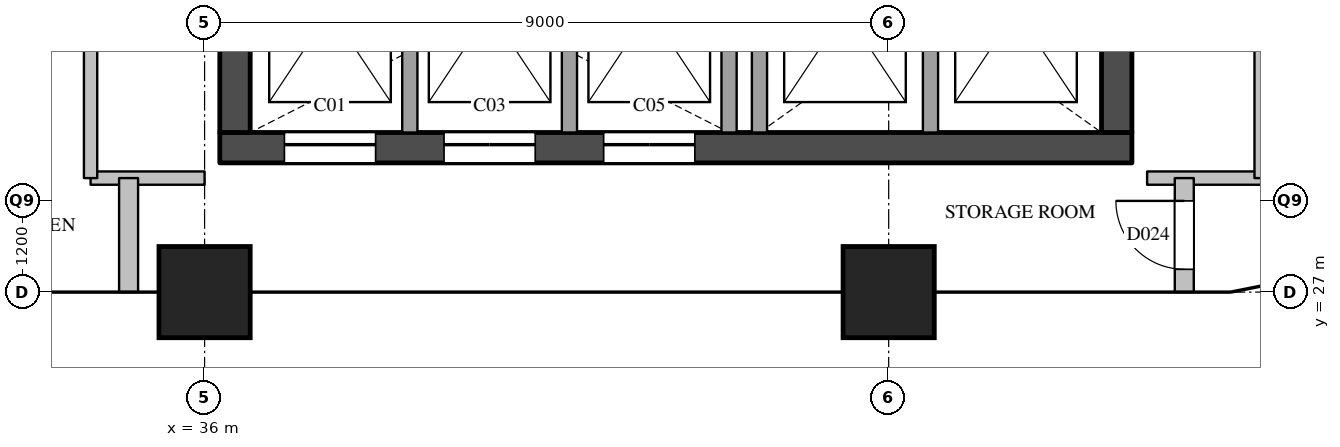
"""IFC4 building model, lengths in metres.
Left out: names, types, materials, properties, quantities, classifications, styles, units other than length and angle.
Written with IfcOpenShell. Run it as: python <this file> out.ifc"""

import sys

from ifc_helpers import new_model, si_unit, direction, frame, frame_2d, origin, origin_2d, place, context, subcontext, project, spatial, rectangle, extrude, element, fill, save


model = new_model("IFC4")
c1 = context("Model", 3, precision=1e-05, world=origin(), true_north=direction((0.0, 1.0)))
c2 = subcontext(c1, "Body", "Model", "MODEL_VIEW")
j1 = project(units=[si_unit("LENGTHUNIT", "METRE"), si_unit("PLANEANGLEUNIT", "RADIAN")], contexts=[c1])
p1 = place(None, origin())
s1 = spatial("IfcSite", under=j1, at=p1, CompositionType="ELEMENT")
p2 = place(p1, origin())
s2 = spatial("IfcBuilding", under=s1, at=p2, CompositionType="ELEMENT")
p3 = place(p2, frame((0.0, 0.0, 234.5)))
s3 = spatial("IfcBuildingStorey", under=s2, at=p3, CompositionType="ELEMENT", Elevation=234.5)
for number, where, z_axis, x_axis in (
    (1, (36.0, 27.0, 0.0), (0.0, 0.0, 1.0), (1.0, 0.0, 0.0)),
    (2, (45.0, 27.0, 0.0), (0.0, 0.0, 1.0), (1.0, 0.0, 0.0)),
):
    element("IfcColumn", number, at=place(p3, frame(where, z_axis=z_axis, x_axis=x_axis)), inside=s3, PredefinedType="COLUMN", context=c2, shape_type="SweptSolid", body=[
        extrude(rectangle(XDim=1.2, YDim=1.2, at=origin_2d()), origin(), (0.0, 0.0, 1.0), 3.9),
    ])
p4 = place(p3, frame((36.2, 28.9, 0.0), z_axis=(0.0, 0.0, 1.0), x_axis=(1.0, 0.0, 0.0)))
e3 = element("IfcWall", 3, at=p4, inside=s3, PredefinedType="SHEAR", context=c2, shape_type="SweptSolid", body=[
    extrude(rectangle(XDim=12.0, YDim=0.4, at=frame_2d((6.0, 0.0))), origin(), (0.0, 0.0, 1.0), 3.6),
])
p5 = place(p4, frame((0.85, 0.0, 0.0)))
e4 = element("IfcOpeningElement", 4, at=p5, cuts=e3, PredefinedType="OPENING", context=c2, shape_type="SweptSolid", body=[
    extrude(rectangle(XDim=1.2, YDim=2.1, at=frame_2d((0.6, 1.05))), frame((0.0, 0.21, 0.0), z_axis=(0.0, -1.0, 0.0), x_axis=(1.0, 0.0, 0.0)), (0.0, 0.0, 1.0), 0.42),
])
p6 = place(p4, frame((2.95, 0.0, 0.0)))
e5 = element("IfcOpeningElement", 5, at=p6, cuts=e3, PredefinedType="OPENING", context=c2, shape_type="SweptSolid", body=[
    extrude(rectangle(XDim=1.2, YDim=2.1, at=frame_2d((0.6, 1.05))), frame((0.0, 0.21, 0.0), z_axis=(0.0, -1.0, 0.0), x_axis=(1.0, 0.0, 0.0)), (0.0, 0.0, 1.0), 0.42),
])
p7 = place(p4, frame((5.05, 0.0, 0.0)))
e6 = element("IfcOpeningElement", 6, at=p7, cuts=e3, PredefinedType="OPENING", context=c2, shape_type="SweptSolid", body=[
    extrude(rectangle(XDim=1.2, YDim=2.1, at=frame_2d((0.6, 1.05))), frame((0.0, 0.21, 0.0), z_axis=(0.0, -1.0, 0.0), x_axis=(1.0, 0.0, 0.0)), (0.0, 0.0, 1.0), 0.42),
])
p8 = place(p3, frame((36.4, 29.1, 0.0), z_axis=(0.0, 0.0, 1.0), x_axis=(0.0, 1.0, 0.0)))
e7 = element("IfcWall", 7, at=p8, inside=s3, PredefinedType="SHEAR", context=c2, shape_type="SweptSolid", body=[
    extrude(rectangle(XDim=20.3, YDim=0.4, at=frame_2d((10.15, 0.0))), origin(), (0.0, 0.0, 1.0), 3.6),
])
p9 = place(p8, frame((3.6, 0.0, 0.0)))
e8 = element("IfcOpeningElement", 8, at=p9, cuts=e7, PredefinedType="OPENING", context=c2, shape_type="SweptSolid", body=[
    extrude(rectangle(XDim=1.8, YDim=2.1, at=frame_2d((0.9, 1.05))), frame((0.0, 0.21, 0.0), z_axis=(0.0, -1.0, 0.0), x_axis=(1.0, 0.0, 0.0)), (0.0, 0.0, 1.0), 0.42),
])
p10 = place(p8, frame((16.4, 0.0, 0.0)))
e9 = element("IfcOpeningElement", 9, at=p10, cuts=e7, PredefinedType="OPENING", context=c2, shape_type="SweptSolid", body=[
    extrude(rectangle(XDim=1.0, YDim=2.1, at=frame_2d((0.5, 1.05))), frame((0.0, 0.21, 0.0), z_axis=(0.0, -1.0, 0.0), x_axis=(1.0, 0.0, 0.0)), (0.0, 0.0, 1.0), 0.42),
])
p11 = place(p3, frame((48.0, 29.1, 0.0), z_axis=(0.0, 0.0, 1.0), x_axis=(0.0, 1.0, 0.0)))
e10 = element("IfcWall", 10, at=p11, inside=s3, PredefinedType="SHEAR", context=c2, shape_type="SweptSolid", body=[
    extrude(rectangle(XDim=20.3, YDim=0.4, at=frame_2d((10.15, 0.0))), origin(), (0.0, 0.0, 1.0), 3.6),
])
p12 = place(p11, frame((12.5, 0.0, 0.0)))
e11 = element("IfcOpeningElement", 11, at=p12, cuts=e10, PredefinedType="OPENING", context=c2, shape_type="SweptSolid", body=[
    extrude(rectangle(XDim=0.7, YDim=2.1, at=frame_2d((0.35, 1.05))), frame((0.0, 0.21, 0.0), z_axis=(0.0, -1.0, 0.0), x_axis=(1.0, 0.0, 0.0)), (0.0, 0.0, 1.0), 0.42),
])
p13 = place(p11, frame((3.9, 0.0, 0.0)))
e12 = element("IfcOpeningElement", 12, at=p13, cuts=e10, PredefinedType="OPENING", context=c2, shape_type="SweptSolid", body=[
    extrude(rectangle(XDim=1.8, YDim=2.1, at=frame_2d((0.9, 1.05))), frame((0.0, 0.21, 0.0), z_axis=(0.0, -1.0, 0.0), x_axis=(1.0, 0.0, 0.0)), (0.0, 0.0, 1.0), 0.42),
])
for number, where, z_axis, x_axis in (
    (13, (38.7, 29.1, 0.0), (0.0, 0.0, 1.0), (0.0, 1.0, 0.0)),
    (14, (40.8, 29.1, 0.0), (0.0, 0.0, 1.0), (0.0, 1.0, 0.0)),
    (15, (42.9, 29.1, 0.0), (0.0, 0.0, 1.0), (0.0, 1.0, 0.0)),
):
    element("IfcWall", number, at=place(p3, frame(where, z_axis=z_axis, x_axis=x_axis)), inside=s3, PredefinedType="SOLIDWALL", context=c2, shape_type="SweptSolid", body=[
        extrude(rectangle(XDim=3.2, YDim=0.2, at=frame_2d((1.6, 0.0))), origin(), (0.0, 0.0, 1.0), 3.6),
    ])
p14 = place(p3, frame((43.3, 29.1, 0.0), z_axis=(0.0, 0.0, 1.0), x_axis=(0.0, 1.0, 0.0)))
e16 = element("IfcWall", 16, at=p14, inside=s3, PredefinedType="SOLIDWALL", context=c2, shape_type="SweptSolid", body=[
    extrude(rectangle(XDim=9.9, YDim=0.2, at=frame_2d((4.95, 0.0))), origin(), (0.0, 0.0, 1.0), 3.6),
])
p15 = place(p3, frame((45.55, 29.1, 0.0), z_axis=(0.0, 0.0, 1.0), x_axis=(0.0, 1.0, 0.0)))
e17 = element("IfcWall", 17, at=p15, inside=s3, PredefinedType="SOLIDWALL", context=c2, shape_type="SweptSolid", body=[
    extrude(rectangle(XDim=3.2, YDim=0.2, at=frame_2d((1.6, 0.0))), origin(), (0.0, 0.0, 1.0), 3.6),
])
for number, where, z_axis, x_axis in (
    (18, (34.5, 28.5, 0.0), (0.0, 0.0, 1.0), (1.0, 0.0, 0.0)),
    (19, (48.4, 28.5, 0.0), (0.0, 0.0, 1.0), (1.0, 0.0, 0.0)),
):
    element("IfcWall", number, at=place(p3, frame(where, z_axis=z_axis, x_axis=x_axis)), inside=s3, PredefinedType="PARTITIONING", context=c2, shape_type="SweptSolid", body=[
        extrude(rectangle(XDim=1.5, YDim=0.175, at=frame_2d((0.75, 0.0))), origin(), (0.0, 0.0, 1.0), 3.6),
    ])
p16 = place(p3, frame((34.5, 28.5, 0.0), z_axis=(0.0, 0.0, 1.0), x_axis=(0.0, 1.0, 0.0)))
e20 = element("IfcWall", 20, at=p16, inside=s3, PredefinedType="PARTITIONING", context=c2, shape_type="SweptSolid", body=[
    extrude(rectangle(XDim=23.0, YDim=0.175, at=frame_2d((11.5, 0.0))), origin(), (0.0, 0.0, 1.0), 3.6),
])
p17 = place(p16, frame((5.1, 0.0, 0.0)))
e21 = element("IfcOpeningElement", 21, at=p17, cuts=e20, PredefinedType="OPENING", context=c2, shape_type="SweptSolid", body=[
    extrude(rectangle(XDim=1.0, YDim=2.1, at=frame_2d((0.5, 1.05))), frame((0.0, 0.097, 0.0), z_axis=(0.0, -1.0, 0.0), x_axis=(1.0, 0.0, 0.0)), (0.0, 0.0, 1.0), 0.195),
])
p18 = place(p16, frame((6.9, 0.0, 0.0)))
e22 = element("IfcOpeningElement", 22, at=p18, cuts=e20, PredefinedType="OPENING", context=c2, shape_type="SweptSolid", body=[
    extrude(rectangle(XDim=1.0, YDim=2.1, at=frame_2d((0.5, 1.05))), frame((0.0, 0.097, 0.0), z_axis=(0.0, -1.0, 0.0), x_axis=(1.0, 0.0, 0.0)), (0.0, 0.0, 1.0), 0.195),
])
p19 = place(p16, frame((16.9, 0.0, 0.0)))
e23 = element("IfcOpeningElement", 23, at=p19, cuts=e20, PredefinedType="OPENING", context=c2, shape_type="SweptSolid", body=[
    extrude(rectangle(XDim=1.0, YDim=2.1, at=frame_2d((0.5, 1.05))), frame((0.0, 0.097, 0.0), z_axis=(0.0, -1.0, 0.0), x_axis=(1.0, 0.0, 0.0)), (0.0, 0.0, 1.0), 0.195),
])
p20 = place(p3, frame((49.9, 28.5, 0.0), z_axis=(0.0, 0.0, 1.0), x_axis=(0.0, 1.0, 0.0)))
e24 = element("IfcWall", 24, at=p20, inside=s3, PredefinedType="PARTITIONING", context=c2, shape_type="SweptSolid", body=[
    extrude(rectangle(XDim=23.0, YDim=0.175, at=frame_2d((11.5, 0.0))), origin(), (0.0, 0.0, 1.0), 3.6),
])
p21 = place(p20, frame((5.3, 0.0, 0.0)))
e25 = element("IfcOpeningElement", 25, at=p21, cuts=e24, PredefinedType="OPENING", context=c2, shape_type="SweptSolid", body=[
    extrude(rectangle(XDim=0.9, YDim=2.1, at=frame_2d((0.45, 1.05))), frame((0.0, 0.097, 0.0), z_axis=(0.0, -1.0, 0.0), x_axis=(1.0, 0.0, 0.0)), (0.0, 0.0, 1.0), 0.195),
])
p22 = place(p20, frame((16.05, 0.0, 0.0)))
e26 = element("IfcOpeningElement", 26, at=p22, cuts=e24, PredefinedType="OPENING", context=c2, shape_type="SweptSolid", body=[
    extrude(rectangle(XDim=0.9, YDim=2.1, at=frame_2d((0.45, 1.05))), frame((0.0, 0.097, 0.0), z_axis=(0.0, -1.0, 0.0), x_axis=(1.0, 0.0, 0.0)), (0.0, 0.0, 1.0), 0.195),
])
p23 = place(p3, frame((35.0, 27.0, 0.0), z_axis=(0.0, 0.0, 1.0), x_axis=(0.0, 1.0, 0.0)))
e27 = element("IfcWall", 27, at=p23, inside=s3, PredefinedType="PARTITIONING", context=c2, shape_type="SweptSolid", body=[
    extrude(rectangle(XDim=1.5, YDim=0.25, at=frame_2d((0.75, 0.0))), origin(), (0.0, 0.0, 1.0), 2.6),
])
p24 = place(p3, frame((48.889, 27.0, 0.0), z_axis=(0.0, 0.0, 1.0), x_axis=(0.0, 1.0, 0.0)))
e28 = element("IfcWall", 28, at=p24, inside=s3, PredefinedType="PARTITIONING", context=c2, shape_type="SweptSolid", body=[
    extrude(rectangle(XDim=1.5, YDim=0.25, at=frame_2d((0.75, 0.0))), origin(), (0.0, 0.0, 1.0), 2.6),
])
p25 = place(p24, frame((0.3, 0.0, 0.0)))
e29 = element("IfcOpeningElement", 29, at=p25, cuts=e28, PredefinedType="OPENING", context=c2, shape_type="SweptSolid", body=[
    extrude(rectangle(XDim=0.9, YDim=2.1, at=frame_2d((0.45, 1.05))), frame((0.0, 0.135, 0.0), z_axis=(0.0, -1.0, 0.0), x_axis=(1.0, 0.0, 0.0)), (0.0, 0.0, 1.0), 0.27),
])
p26 = place(p5, origin())
e30 = element("IfcDoor", 30, at=p26, inside=s3, OperationType="SLIDING_TO_LEFT", PredefinedType="DOOR", context=c2, shape_type="SweptSolid", body=[
    extrude(rectangle(XDim=1.2, YDim=2.1, at=frame_2d((0.6, 1.05))), frame((0.0, 0.025, 0.0), z_axis=(0.0, -1.0, 0.0), x_axis=(1.0, 0.0, 0.0)), (0.0, 0.0, 1.0), 0.05),
])
fill(e4, e30)
p27 = place(p6, origin())
e31 = element("IfcDoor", 31, at=p27, inside=s3, OperationType="SLIDING_TO_LEFT", PredefinedType="DOOR", context=c2, shape_type="SweptSolid", body=[
    extrude(rectangle(XDim=1.2, YDim=2.1, at=frame_2d((0.6, 1.05))), frame((0.0, 0.025, 0.0), z_axis=(0.0, -1.0, 0.0), x_axis=(1.0, 0.0, 0.0)), (0.0, 0.0, 1.0), 0.05),
])
fill(e5, e31)
p28 = place(p7, origin())
e32 = element("IfcDoor", 32, at=p28, inside=s3, OperationType="SLIDING_TO_LEFT", PredefinedType="DOOR", context=c2, shape_type="SweptSolid", body=[
    extrude(rectangle(XDim=1.2, YDim=2.1, at=frame_2d((0.6, 1.05))), frame((0.0, 0.025, 0.0), z_axis=(0.0, -1.0, 0.0), x_axis=(1.0, 0.0, 0.0)), (0.0, 0.0, 1.0), 0.05),
])
fill(e6, e32)
p29 = place(p25, origin())
e33 = element("IfcDoor", 33, at=p29, inside=s3, OperationType="SINGLE_SWING_RIGHT", PredefinedType="DOOR", context=c2, shape_type="SweptSolid", body=[
    extrude(rectangle(XDim=0.9, YDim=2.1, at=frame_2d((0.45, 1.05))), frame((0.0, 0.025, 0.0), z_axis=(0.0, -1.0, 0.0), x_axis=(1.0, 0.0, 0.0)), (0.0, 0.0, 1.0), 0.05),
])
fill(e29, e33)
save(model, sys.argv[1])
